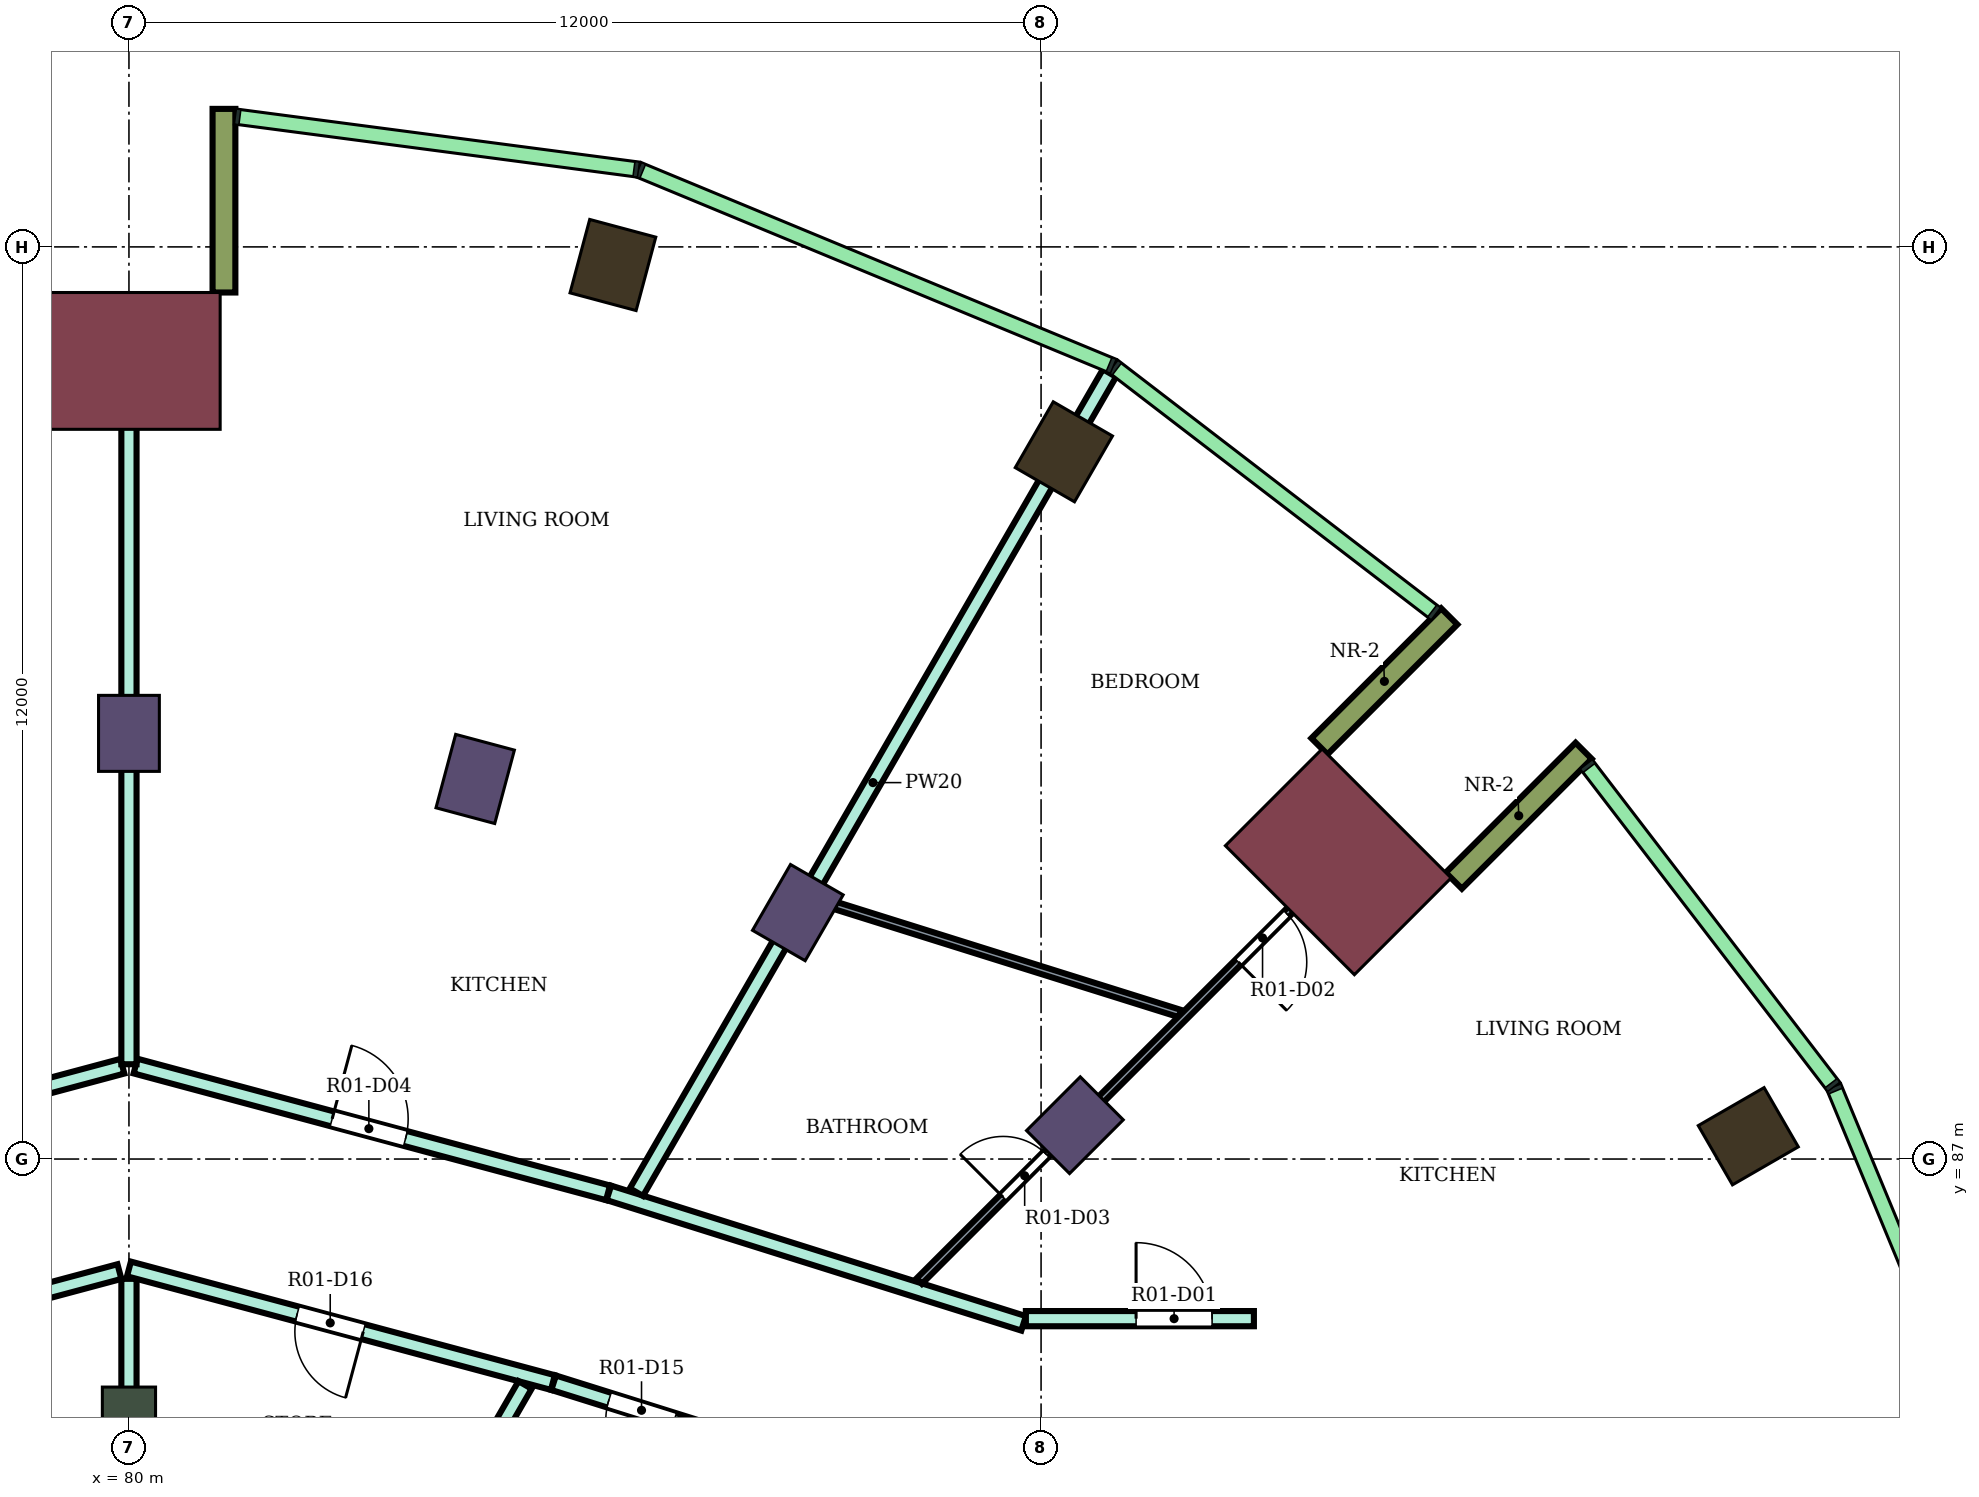
"""IFC4 building model, lengths in metres.
Left out: names, types, materials, properties, quantities, classifications, styles, units other than length and angle.
Written with IfcOpenShell. Run it as: python <this file> out.ifc"""

import sys

from ifc_helpers import new_model, si_unit, direction, frame, frame_2d, origin, origin_2d, place, context, subcontext, project, spatial, rectangle, extrude, element, fill, save


model = new_model("IFC4")
c1 = context("Model", 3, precision=1e-05, world=origin(), true_north=direction((0.0, 1.0)))
c2 = subcontext(c1, "Body", "Model", "MODEL_VIEW")
j1 = project(units=[si_unit("LENGTHUNIT", "METRE"), si_unit("PLANEANGLEUNIT", "RADIAN")], contexts=[c1])
p1 = place(None, origin())
s1 = spatial("IfcSite", under=j1, at=p1, CompositionType="ELEMENT")
p2 = place(p1, origin())
s2 = spatial("IfcBuilding", under=s1, at=p2, CompositionType="ELEMENT")
p3 = place(p2, frame((0.0, 0.0, 161.8)))
s3 = spatial("IfcBuildingStorey", under=s2, at=p3, CompositionType="ELEMENT", Elevation=161.8)
for number, where, z_axis, x_axis in (
    (1, (101.304, 87.3, 0.0), (0.0, 0.0, 1.0), (0.866, 0.5, 0.0)),
    (2, (92.3, 96.304, 0.0), (0.0, 0.0, 1.0), (0.5, 0.866, 0.0)),
    (3, (86.367, 98.762, 0.0), (0.0, 0.0, 1.0), (0.259, 0.966, 0.0)),
):
    element("IfcColumn", number, at=place(p3, frame(where, z_axis=z_axis, x_axis=x_axis)), inside=s3, PredefinedType="COLUMN", context=c2, shape_type="SweptSolid", body=[
        extrude(rectangle(XDim=1.0, YDim=0.9, at=origin_2d()), origin(), (0.0, 0.0, 1.0), 4.1),
    ])
for number, where, z_axis, x_axis in (
    (4, (92.445, 87.445, 0.0), (0.0, 0.0, 1.0), (0.707, 0.707, 0.0)),
    (5, (88.8, 90.242, 0.0), (0.0, 0.0, 1.0), (0.5, 0.866, 0.0)),
    (6, (84.555, 92.0, 0.0), (0.0, 0.0, 1.0), (0.259, 0.966, 0.0)),
    (7, (80.0, 92.6, 0.0), (0.0, 0.0, 1.0), (0.0, 1.0, 0.0)),
):
    element("IfcColumn", number, at=place(p3, frame(where, z_axis=z_axis, x_axis=x_axis)), inside=s3, PredefinedType="COLUMN", context=c2, shape_type="SweptSolid", body=[
        extrude(rectangle(XDim=1.0, YDim=0.8, at=origin_2d()), origin(), (0.0, 0.0, 1.0), 4.1),
    ])
p4 = place(p3, frame((80.0, 83.6, 0.0), z_axis=(0.0, 0.0, 1.0), x_axis=(0.0, 1.0, 0.0)))
e8 = element("IfcColumn", 8, at=p4, inside=s3, PredefinedType="COLUMN", context=c2, shape_type="SweptSolid", body=[
    extrude(rectangle(XDim=0.8, YDim=0.7, at=origin_2d()), origin(), (0.0, 0.0, 1.0), 4.1),
])
for number, where, z_axis, x_axis in (
    (9, (95.91, 90.91, 0.0), (0.0, 0.0, 1.0), (0.707, 0.707, 0.0)),
    (10, (80.0, 97.5, 0.0), (0.0, 0.0, 1.0), (0.0, 1.0, 0.0)),
):
    element("IfcColumn", number, at=place(p3, frame(where, z_axis=z_axis, x_axis=x_axis)), inside=s3, PredefinedType="COLUMN", context=c2, shape_type="SweptSolid", body=[
        extrude(rectangle(XDim=1.8, YDim=2.4, at=origin_2d()), origin(), (0.0, 0.0, 1.0), 4.1),
    ])
for number, where, z_axis, x_axis in (
    (11, (97.43, 90.662, 0.0), (0.0, 0.0, 1.0), (0.707, 0.707, 0.0)),
    (12, (95.662, 92.43, 0.0), (0.0, 0.0, 1.0), (0.707, 0.707, 0.0)),
    (13, (81.25, 98.4, 0.0), (0.0, 0.0, 1.0), (0.0, 1.0, 0.0)),
):
    element("IfcWall", number, at=place(p3, frame(where, z_axis=z_axis, x_axis=x_axis)), inside=s3, PredefinedType="NOTDEFINED", context=c2, shape_type="SweptSolid", body=[
        extrude(rectangle(XDim=2.416, YDim=0.3, at=frame_2d((1.208, 0.0))), origin(), (0.0, 0.0, 1.0), 4.1),
    ])
p5 = place(p3, frame((73.687, 86.554, 0.0), z_axis=(0.0, 0.0, 1.0), x_axis=(0.965999420828, 0.258544230182, 0.0)))
e14 = element("IfcWall", 14, at=p5, inside=s3, PredefinedType="PARTITIONING", context=c2, shape_type="SweptSolid", body=[
    extrude(rectangle(XDim=6.446, YDim=0.2, at=frame_2d((3.223, 0.0))), origin(), (0.0, 0.0, 1.0), 3.65),
])
p6 = place(p5, frame((3.638, 0.0, 0.0)))
e15 = element("IfcOpeningElement", 15, at=p6, cuts=e14, PredefinedType="OPENING", context=c2, shape_type="SweptSolid", body=[
    extrude(rectangle(XDim=1.0, YDim=2.1, at=frame_2d((0.5, 1.05))), frame((0.0, 0.11, 0.0), z_axis=(0.0, -1.0, 0.0), x_axis=(1.0, 0.0, 0.0)), (0.0, 0.0, 1.0), 0.22),
])
p7 = place(p3, frame((74.413, 84.057, 0.0), z_axis=(0.0, 0.0, 1.0), x_axis=(0.965972135939, 0.258646153246, 0.0)))
e16 = element("IfcWall", 16, at=p7, inside=s3, PredefinedType="PARTITIONING", context=c2, shape_type="SweptSolid", body=[
    extrude(rectangle(XDim=5.654, YDim=0.2, at=frame_2d((2.827, 0.0))), origin(), (0.0, 0.0, 1.0), 3.65),
])
p8 = place(p7, frame((2.593, 0.0, 0.0)))
e17 = element("IfcOpeningElement", 17, at=p8, cuts=e16, PredefinedType="OPENING", context=c2, shape_type="SweptSolid", body=[
    extrude(rectangle(XDim=0.9, YDim=2.1, at=frame_2d((0.45, 1.05))), frame((0.0, 0.11, 0.0), z_axis=(0.0, -1.0, 0.0), x_axis=(1.0, 0.0, 0.0)), (0.0, 0.0, 1.0), 0.22),
])
p9 = place(p3, frame((80.0, 82.699, 0.0), z_axis=(0.0, 0.0, 1.0), x_axis=(0.0, 1.0, 0.0)))
e18 = element("IfcWall", 18, at=p9, inside=s3, PredefinedType="PARTITIONING", context=c2, shape_type="SweptSolid", body=[
    extrude(rectangle(XDim=2.725, YDim=0.2, at=frame_2d((1.363, 0.0))), origin(), (0.0, 0.0, 1.0), 3.65),
])
p10 = place(p3, frame((80.0, 85.554, 0.0), z_axis=(0.0, 0.0, 1.0), x_axis=(0.965928989968, -0.258807237802, 0.0)))
e19 = element("IfcWall", 19, at=p10, inside=s3, PredefinedType="PARTITIONING", context=c2, shape_type="SweptSolid", body=[
    extrude(rectangle(XDim=5.774, YDim=0.2, at=frame_2d((2.887, 0.0))), origin(), (0.0, 0.0, 1.0), 3.65),
])
p11 = place(p10, frame((2.292, 0.0, 0.0)))
e20 = element("IfcOpeningElement", 20, at=p11, cuts=e19, PredefinedType="OPENING", context=c2, shape_type="SweptSolid", body=[
    extrude(rectangle(XDim=0.9, YDim=2.1, at=frame_2d((0.45, 1.05))), frame((0.0, 0.11, 0.0), z_axis=(0.0, -1.0, 0.0), x_axis=(1.0, 0.0, 0.0)), (0.0, 0.0, 1.0), 0.22),
])
p12 = place(p3, frame((80.087, 88.223, 0.0), z_axis=(0.0, 0.0, 1.0), x_axis=(0.965852330757, -0.25909317855, 0.0)))
e21 = element("IfcWall", 21, at=p12, inside=s3, PredefinedType="PARTITIONING", context=c2, shape_type="SweptSolid", body=[
    extrude(rectangle(XDim=6.436, YDim=0.2, at=frame_2d((3.218, 0.0))), origin(), (0.0, 0.0, 1.0), 3.65),
])
p13 = place(p12, frame((2.678, 0.0, 0.0)))
e22 = element("IfcOpeningElement", 22, at=p13, cuts=e21, PredefinedType="OPENING", context=c2, shape_type="SweptSolid", body=[
    extrude(rectangle(XDim=1.0, YDim=2.1, at=frame_2d((0.5, 1.05))), frame((0.0, 0.11, 0.0), z_axis=(0.0, -1.0, 0.0), x_axis=(1.0, 0.0, 0.0)), (0.0, 0.0, 1.0), 0.22),
])
p14 = place(p3, frame((80.0, 88.247, 0.0), z_axis=(0.0, 0.0, 1.0), x_axis=(0.0, 1.0, 0.0)))
e23 = element("IfcWall", 23, at=p14, inside=s3, PredefinedType="PARTITIONING", context=c2, shape_type="SweptSolid", body=[
    extrude(rectangle(XDim=9.952, YDim=0.2, at=frame_2d((4.976, 0.0))), origin(), (0.0, 0.0, 1.0), 3.65),
])
p15 = place(p3, frame((83.848, 81.667, 0.0), z_axis=(0.0, 0.0, 1.0), x_axis=(0.500185068774, 0.865918527909, 0.0)))
e24 = element("IfcWall", 24, at=p15, inside=s3, PredefinedType="PARTITIONING", context=c2, shape_type="SweptSolid", body=[
    extrude(rectangle(XDim=2.726, YDim=0.2, at=frame_2d((1.363, 0.0))), origin(), (0.0, 0.0, 1.0), 3.65),
])
p16 = place(p3, frame((85.587, 84.057, 0.0), z_axis=(0.0, 0.0, 1.0), x_axis=(0.954239513179, -0.299043393987, 0.0)))
e25 = element("IfcWall", 25, at=p16, inside=s3, PredefinedType="PARTITIONING", context=c2, shape_type="SweptSolid", body=[
    extrude(rectangle(XDim=2.424, YDim=0.2, at=frame_2d((1.212, 0.0))), origin(), (0.0, 0.0, 1.0), 3.65),
])
p17 = place(p16, frame((0.762, 0.0, 0.0)))
e26 = element("IfcOpeningElement", 26, at=p17, cuts=e25, PredefinedType="OPENING", context=c2, shape_type="SweptSolid", body=[
    extrude(rectangle(XDim=0.9, YDim=2.1, at=frame_2d((0.45, 1.05))), frame((0.0, 0.11, 0.0), z_axis=(0.0, -1.0, 0.0), x_axis=(1.0, 0.0, 0.0)), (0.0, 0.0, 1.0), 0.22),
])
p18 = place(p3, frame((86.313, 86.555, 0.0), z_axis=(0.0, 0.0, 1.0), x_axis=(0.953919398959, -0.300062960544, 0.0)))
e27 = element("IfcWall", 27, at=p18, inside=s3, PredefinedType="PARTITIONING", context=c2, shape_type="SweptSolid", body=[
    extrude(rectangle(XDim=5.721, YDim=0.2, at=frame_2d((2.86, 0.0))), origin(), (0.0, 0.0, 1.0), 3.65),
])
p19 = place(p3, frame((86.677, 86.564, 0.0), z_axis=(0.0, 0.0, 1.0), x_axis=(0.500120377296, 0.865955892764, 0.0)))
e28 = element("IfcWall", 28, at=p19, inside=s3, PredefinedType="PARTITIONING", context=c2, shape_type="SweptSolid", body=[
    extrude(rectangle(XDim=12.445, YDim=0.2, at=frame_2d((6.222, 0.0))), origin(), (0.0, 0.0, 1.0), 3.65),
])
p20 = place(p3, frame((91.8, 84.9, 0.0), z_axis=(0.0, 0.0, 1.0), x_axis=(1.0, 0.0, 0.0)))
e29 = element("IfcWall", 29, at=p20, inside=s3, PredefinedType="PARTITIONING", context=c2, shape_type="SweptSolid", body=[
    extrude(rectangle(XDim=3.0, YDim=0.2, at=frame_2d((1.5, 0.0))), origin(), (0.0, 0.0, 1.0), 3.65),
])
p21 = place(p20, frame((1.45, 0.0, 0.0)))
e30 = element("IfcOpeningElement", 30, at=p21, cuts=e29, PredefinedType="OPENING", context=c2, shape_type="SweptSolid", body=[
    extrude(rectangle(XDim=1.0, YDim=2.1, at=frame_2d((0.5, 1.05))), frame((0.0, 0.11, 0.0), z_axis=(0.0, -1.0, 0.0), x_axis=(1.0, 0.0, 0.0)), (0.0, 0.0, 1.0), 0.22),
])
p22 = place(p3, frame((89.026, 90.419, 0.0), z_axis=(0.0, 0.0, 1.0), x_axis=(0.954207609901, -0.299145177475, 0.0)))
e31 = element("IfcWall", 31, at=p22, inside=s3, PredefinedType="PARTITIONING", context=c2, shape_type="SweptSolid", body=[
    extrude(rectangle(XDim=5.031, YDim=0.1, at=frame_2d((2.516, 0.0))), origin(), (0.0, 0.0, 1.0), 3.65),
])
p23 = place(p3, frame((90.396, 85.393, 0.0), z_axis=(0.0, 0.0, 1.0), x_axis=(0.707236031471, 0.706977507273, 0.0)))
e32 = element("IfcWall", 32, at=p23, inside=s3, PredefinedType="PARTITIONING", context=c2, shape_type="SweptSolid", body=[
    extrude(rectangle(XDim=8.499, YDim=0.1, at=frame_2d((4.25, 0.0))), origin(), (0.0, 0.0, 1.0), 3.65),
])
p24 = place(p23, frame((5.937, 0.0, 0.0)))
e33 = element("IfcOpeningElement", 33, at=p24, cuts=e32, PredefinedType="OPENING", context=c2, shape_type="SweptSolid", body=[
    extrude(rectangle(XDim=0.9, YDim=2.1, at=frame_2d((0.45, 1.05))), frame((0.0, 0.06, 0.0), z_axis=(0.0, -1.0, 0.0), x_axis=(1.0, 0.0, 0.0)), (0.0, 0.0, 1.0), 0.12),
])
p25 = place(p23, frame((1.562, 0.0, 0.0)))
e34 = element("IfcOpeningElement", 34, at=p25, cuts=e32, PredefinedType="OPENING", context=c2, shape_type="SweptSolid", body=[
    extrude(rectangle(XDim=0.8, YDim=2.1, at=frame_2d((0.4, 1.05))), frame((0.0, 0.06, 0.0), z_axis=(0.0, -1.0, 0.0), x_axis=(1.0, 0.0, 0.0)), (0.0, 0.0, 1.0), 0.12),
])
p26 = place(p21, origin())
e35 = element("IfcDoor", 35, at=p26, inside=s3, OperationType="SINGLE_SWING_LEFT", PredefinedType="DOOR", context=c2, shape_type="SweptSolid", body=[
    extrude(rectangle(XDim=1.0, YDim=2.1, at=frame_2d((0.5, 1.05))), frame((0.0, 0.025, 0.0), z_axis=(0.0, -1.0, 0.0), x_axis=(1.0, 0.0, 0.0)), (0.0, 0.0, 1.0), 0.05),
])
fill(e30, e35)
p27 = place(p24, frame((0.9, 0.0, 0.0), z_axis=(0.0, 0.0, 1.0), x_axis=(-1.0, 0.0, 0.0)))
e36 = element("IfcDoor", 36, at=p27, inside=s3, OperationType="SINGLE_SWING_RIGHT", PredefinedType="DOOR", context=c2, shape_type="SweptSolid", body=[
    extrude(rectangle(XDim=0.9, YDim=2.1, at=frame_2d((0.45, 1.05))), frame((0.0, 0.025, 0.0), z_axis=(0.0, -1.0, 0.0), x_axis=(1.0, 0.0, 0.0)), (0.0, 0.0, 1.0), 0.05),
])
fill(e33, e36)
p28 = place(p25, origin())
e37 = element("IfcDoor", 37, at=p28, inside=s3, OperationType="SINGLE_SWING_LEFT", PredefinedType="DOOR", context=c2, shape_type="SweptSolid", body=[
    extrude(rectangle(XDim=0.8, YDim=2.1, at=frame_2d((0.4, 1.05))), frame((0.0, 0.025, 0.0), z_axis=(0.0, -1.0, 0.0), x_axis=(1.0, 0.0, 0.0)), (0.0, 0.0, 1.0), 0.05),
])
fill(e34, e37)
p29 = place(p13, origin())
e38 = element("IfcDoor", 38, at=p29, inside=s3, OperationType="SINGLE_SWING_LEFT", PredefinedType="DOOR", context=c2, shape_type="SweptSolid", body=[
    extrude(rectangle(XDim=1.0, YDim=2.1, at=frame_2d((0.5, 1.05))), frame((0.0, 0.025, 0.0), z_axis=(0.0, -1.0, 0.0), x_axis=(1.0, 0.0, 0.0)), (0.0, 0.0, 1.0), 0.05),
])
fill(e22, e38)
p30 = place(p17, frame((0.9, 0.0, 0.0), z_axis=(0.0, 0.0, 1.0), x_axis=(-1.0, 0.0, 0.0)))
e39 = element("IfcDoor", 39, at=p30, inside=s3, OperationType="SINGLE_SWING_LEFT", PredefinedType="DOOR", context=c2, shape_type="SweptSolid", body=[
    extrude(rectangle(XDim=0.9, YDim=2.1, at=frame_2d((0.45, 1.05))), frame((0.0, 0.025, 0.0), z_axis=(0.0, -1.0, 0.0), x_axis=(1.0, 0.0, 0.0)), (0.0, 0.0, 1.0), 0.05),
])
fill(e26, e39)
p31 = place(p11, frame((0.9, 0.0, 0.0), z_axis=(0.0, 0.0, 1.0), x_axis=(-1.0, 0.0, 0.0)))
e40 = element("IfcDoor", 40, at=p31, inside=s3, OperationType="SINGLE_SWING_LEFT", PredefinedType="DOOR", context=c2, shape_type="SweptSolid", body=[
    extrude(rectangle(XDim=0.9, YDim=2.1, at=frame_2d((0.45, 1.05))), frame((0.0, 0.025, 0.0), z_axis=(0.0, -1.0, 0.0), x_axis=(1.0, 0.0, 0.0)), (0.0, 0.0, 1.0), 0.05),
])
fill(e20, e40)
save(model, sys.argv[1])
